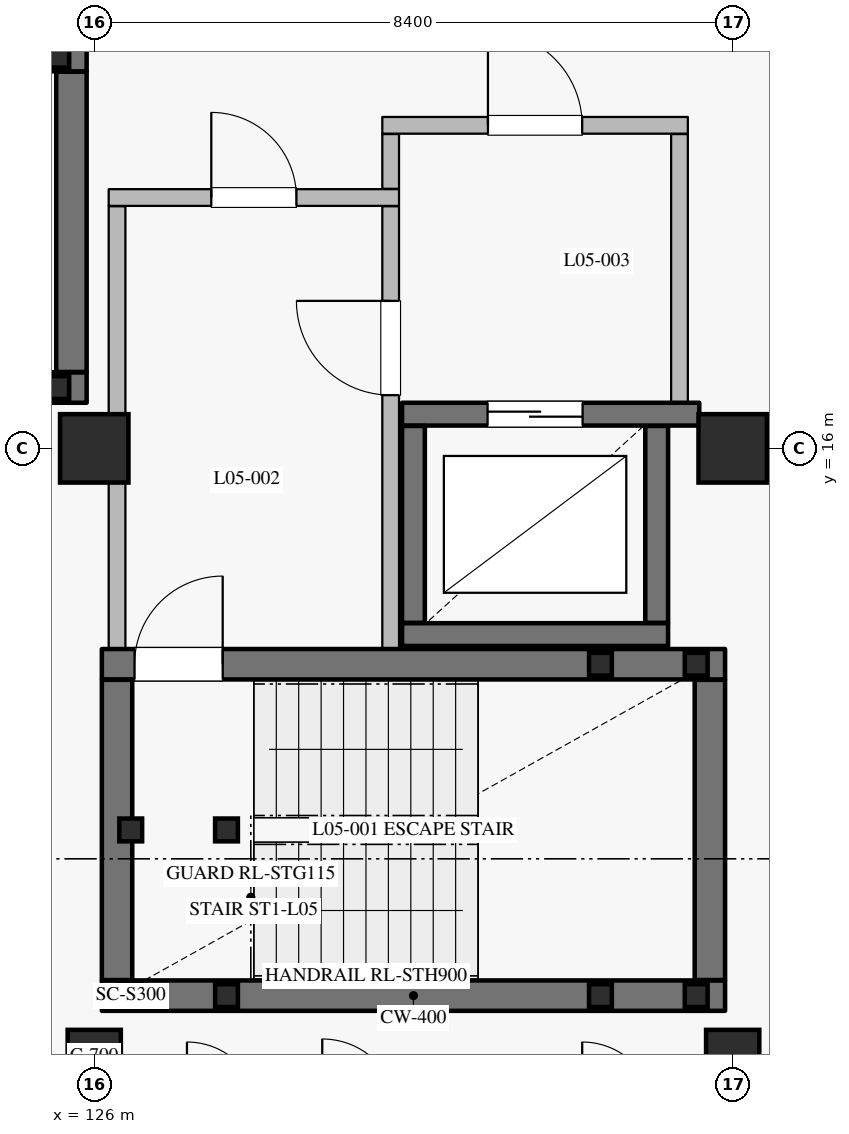
"""IFC4 building model, lengths in metres.
Left out: names, types, materials, properties, quantities, classifications, styles, units other than length and angle.
Written with IfcOpenShell. Run it as: python <this file> out.ifc"""

import sys

from ifc_helpers import new_model, si_unit, direction, frame, frame_2d, origin, origin_2d, place, context, subcontext, project, spatial, rectangle, hollow_rectangle, extrude, element, fill, save


model = new_model("IFC4")
c1 = context("Model", 3, precision=1e-05, world=origin(), true_north=direction((0.0, 1.0)))
c2 = subcontext(c1, "Body", "Model", "MODEL_VIEW")
j1 = project(units=[si_unit("LENGTHUNIT", "METRE"), si_unit("PLANEANGLEUNIT", "RADIAN")], contexts=[c1])
p1 = place(None, origin())
s1 = spatial("IfcSite", under=j1, at=p1, CompositionType="ELEMENT")
p2 = place(p1, origin())
s2 = spatial("IfcBuilding", under=s1, at=p2, CompositionType="ELEMENT")
p3 = place(p2, frame((0.0, 0.0, 25.2)))
s3 = spatial("IfcBuildingStorey", under=s2, at=p3, CompositionType="ELEMENT", Elevation=25.2)
for number, where, z_axis, x_axis in (
    (1, (126.0, 16.0, 0.0), (0.0, 0.0, 1.0), (1.0, 0.0, 0.0)),
    (2, (134.4, 16.0, 0.0), (0.0, 0.0, 1.0), (1.0, 0.0, 0.0)),
):
    element("IfcColumn", number, at=place(p3, frame(where, z_axis=z_axis, x_axis=x_axis)), inside=s3, PredefinedType="COLUMN", context=c2, shape_type="SweptSolid", body=[
        extrude(rectangle(XDim=0.9, YDim=0.9, at=origin_2d()), origin(), (0.0, 0.0, 1.0), 3.6),
    ])
for number, where, z_axis, x_axis in (
    (3, (126.0, 8.0, 0.0), (0.0, 0.0, 1.0), (1.0, 0.0, 0.0)),
    (4, (134.4, 8.0, 0.0), (0.0, 0.0, 1.0), (1.0, 0.0, 0.0)),
):
    element("IfcColumn", number, at=place(p3, frame(where, z_axis=z_axis, x_axis=x_axis)), inside=s3, PredefinedType="COLUMN", context=c2, shape_type="SweptSolid", body=[
        extrude(rectangle(XDim=0.7, YDim=0.7, at=origin_2d()), origin(), (0.0, 0.0, 1.0), 3.6),
    ])
p4 = place(p3, frame((130.05, 13.55, 0.0), z_axis=(0.0, 0.0, 1.0), x_axis=(1.0, 0.0, 0.0)))
e5 = element("IfcWall", 5, at=p4, inside=s3, PredefinedType="SHEAR", context=c2, shape_type="SweptSolid", body=[
    extrude(rectangle(XDim=3.5, YDim=0.3, at=frame_2d((1.75, 0.0))), origin(), (0.0, 0.0, 1.0), 3.335),
])
p5 = place(p3, frame((133.4, 13.705, 0.0), z_axis=(0.0, 0.0, 1.0), x_axis=(0.0, 1.0, 0.0)))
e6 = element("IfcWall", 6, at=p5, inside=s3, PredefinedType="SHEAR", context=c2, shape_type="SweptSolid", body=[
    extrude(rectangle(XDim=2.59, YDim=0.3, at=frame_2d((1.295, 0.0))), origin(), (0.0, 0.0, 1.0), 3.335),
])
p6 = place(p3, frame((133.96, 16.45, 0.0), z_axis=(0.0, 0.0, 1.0), x_axis=(-1.0, 0.0, 0.0)))
e7 = element("IfcWall", 7, at=p6, inside=s3, PredefinedType="SHEAR", context=c2, shape_type="SweptSolid", body=[
    extrude(rectangle(XDim=3.91, YDim=0.3, at=frame_2d((1.955, 0.0))), origin(), (0.0, 0.0, 1.0), 3.335),
])
p7 = place(p6, frame((1.535, 0.0, 0.0)))
e8 = element("IfcOpeningElement", 8, at=p7, cuts=e7, PredefinedType="OPENING", context=c2, shape_type="SweptSolid", body=[
    extrude(rectangle(XDim=1.25, YDim=2.25, at=frame_2d((0.625, 1.125))), frame((0.0, 0.16, 0.0), z_axis=(0.0, -1.0, 0.0), x_axis=(1.0, 0.0, 0.0)), (0.0, 0.0, 1.0), 0.32),
])
p8 = place(p3, frame((130.2, 16.295, 0.0), z_axis=(0.0, 0.0, 1.0), x_axis=(0.0, -1.0, 0.0)))
e9 = element("IfcWall", 9, at=p8, inside=s3, PredefinedType="SHEAR", context=c2, shape_type="SweptSolid", body=[
    extrude(rectangle(XDim=2.59, YDim=0.3, at=frame_2d((1.295, 0.0))), origin(), (0.0, 0.0, 1.0), 3.335),
])
p9 = place(p3, frame((126.1, 8.8, 0.0), z_axis=(0.0, 0.0, 1.0), x_axis=(1.0, 0.0, 0.0)))
e10 = element("IfcWall", 10, at=p9, inside=s3, PredefinedType="SHEAR", context=c2, shape_type="SweptSolid", body=[
    extrude(rectangle(XDim=8.2, YDim=0.4, at=frame_2d((4.1, 0.0))), origin(), (0.0, 0.0, 1.0), 3.335),
])
p10 = place(p3, frame((134.1, 9.005, 0.0), z_axis=(0.0, 0.0, 1.0), x_axis=(0.0, 1.0, 0.0)))
e11 = element("IfcWall", 11, at=p10, inside=s3, PredefinedType="SHEAR", context=c2, shape_type="SweptSolid", body=[
    extrude(rectangle(XDim=3.95, YDim=0.4, at=frame_2d((1.975, 0.0))), origin(), (0.0, 0.0, 1.0), 3.335),
])
p11 = place(p3, frame((126.1, 13.16, 0.0), z_axis=(0.0, 0.0, 1.0), x_axis=(1.0, 0.0, 0.0)))
e12 = element("IfcWall", 12, at=p11, inside=s3, PredefinedType="SHEAR", context=c2, shape_type="SweptSolid", body=[
    extrude(rectangle(XDim=8.2, YDim=0.4, at=frame_2d((4.1, 0.0))), origin(), (0.0, 0.0, 1.0), 3.335),
])
p12 = place(p11, frame((0.43, 0.0, 0.0)))
e13 = element("IfcOpeningElement", 13, at=p12, cuts=e12, PredefinedType="OPENING", context=c2, shape_type="SweptSolid", body=[
    extrude(rectangle(XDim=1.16, YDim=2.2, at=frame_2d((0.58, 1.1))), frame((0.0, 0.21, 0.0), z_axis=(0.0, -1.0, 0.0), x_axis=(1.0, 0.0, 0.0)), (0.0, 0.0, 1.0), 0.42),
])
p13 = place(p3, frame((126.3, 9.005, 0.0), z_axis=(0.0, 0.0, 1.0), x_axis=(0.0, 1.0, 0.0)))
e14 = element("IfcWall", 14, at=p13, inside=s3, PredefinedType="SHEAR", context=c2, shape_type="SweptSolid", body=[
    extrude(rectangle(XDim=3.95, YDim=0.4, at=frame_2d((1.975, 0.0))), origin(), (0.0, 0.0, 1.0), 3.335),
])
p14 = place(p3, frame((126.3, 13.365, 0.0), z_axis=(0.0, 0.0, 1.0), x_axis=(0.0, 1.0, 0.0)))
e15 = element("IfcWall", 15, at=p14, inside=s3, PredefinedType="PARTITIONING", context=c2, shape_type="SweptSolid", body=[
    extrude(rectangle(XDim=5.82, YDim=0.22, at=frame_2d((2.91, 0.0))), origin(), (0.0, 0.0, 1.0), 3.335),
])
p15 = place(p3, frame((126.19, 19.3, 0.0), z_axis=(0.0, 0.0, 1.0), x_axis=(1.0, 0.0, 0.0)))
e16 = element("IfcWall", 16, at=p15, inside=s3, PredefinedType="PARTITIONING", context=c2, shape_type="SweptSolid", body=[
    extrude(rectangle(XDim=3.82, YDim=0.22, at=frame_2d((1.91, 0.0))), origin(), (0.0, 0.0, 1.0), 3.335),
])
p16 = place(p15, frame((1.35, 0.0, 0.0)))
e17 = element("IfcOpeningElement", 17, at=p16, cuts=e16, PredefinedType="OPENING", context=c2, shape_type="SweptSolid", body=[
    extrude(rectangle(XDim=1.12, YDim=2.2, at=frame_2d((0.56, 1.1))), frame((0.0, 0.12, 0.0), z_axis=(0.0, -1.0, 0.0), x_axis=(1.0, 0.0, 0.0)), (0.0, 0.0, 1.0), 0.24),
])
p17 = place(p3, frame((129.9, 13.365, 0.0), z_axis=(0.0, 0.0, 1.0), x_axis=(0.0, 1.0, 0.0)))
e18 = element("IfcWall", 18, at=p17, inside=s3, PredefinedType="PARTITIONING", context=c2, shape_type="SweptSolid", body=[
    extrude(rectangle(XDim=5.82, YDim=0.22, at=frame_2d((2.91, 0.0))), origin(), (0.0, 0.0, 1.0), 3.335),
])
p18 = place(p17, frame((3.335, 0.0, 0.0)))
e19 = element("IfcOpeningElement", 19, at=p18, cuts=e18, PredefinedType="OPENING", context=c2, shape_type="SweptSolid", body=[
    extrude(rectangle(XDim=1.24, YDim=2.2, at=frame_2d((0.62, 1.1))), frame((0.0, 0.12, 0.0), z_axis=(0.0, -1.0, 0.0), x_axis=(1.0, 0.0, 0.0)), (0.0, 0.0, 1.0), 0.24),
])
p19 = place(p3, frame((129.9, 19.415, 0.0), z_axis=(0.0, 0.0, 1.0), x_axis=(0.0, 1.0, 0.0)))
e20 = element("IfcWall", 20, at=p19, inside=s3, PredefinedType="PARTITIONING", context=c2, shape_type="SweptSolid", body=[
    extrude(rectangle(XDim=0.72, YDim=0.22, at=frame_2d((0.36, 0.0))), origin(), (0.0, 0.0, 1.0), 3.335),
])
p20 = place(p3, frame((133.7, 16.605, 0.0), z_axis=(0.0, 0.0, 1.0), x_axis=(0.0, 1.0, 0.0)))
e21 = element("IfcWall", 21, at=p20, inside=s3, PredefinedType="PARTITIONING", context=c2, shape_type="SweptSolid", body=[
    extrude(rectangle(XDim=3.53, YDim=0.22, at=frame_2d((1.765, 0.0))), origin(), (0.0, 0.0, 1.0), 3.335),
])
p21 = place(p3, frame((129.79, 20.25, 0.0), z_axis=(0.0, 0.0, 1.0), x_axis=(1.0, 0.0, 0.0)))
e22 = element("IfcWall", 22, at=p21, inside=s3, PredefinedType="PARTITIONING", context=c2, shape_type="SweptSolid", body=[
    extrude(rectangle(XDim=4.02, YDim=0.22, at=frame_2d((2.01, 0.0))), origin(), (0.0, 0.0, 1.0), 3.335),
])
p22 = place(p21, frame((1.39, 0.0, 0.0)))
e23 = element("IfcOpeningElement", 23, at=p22, cuts=e22, PredefinedType="OPENING", context=c2, shape_type="SweptSolid", body=[
    extrude(rectangle(XDim=1.24, YDim=2.2, at=frame_2d((0.62, 1.1))), frame((0.0, 0.12, 0.0), z_axis=(0.0, -1.0, 0.0), x_axis=(1.0, 0.0, 0.0)), (0.0, 0.0, 1.0), 0.24),
])
for number, where, z_axis, x_axis in (
    (24, (126.48, 8.8, 0.0), (0.0, 0.0, 1.0), (1.0, 0.0, 0.0)),
    (25, (126.48, 10.98, 0.0), (0.0, 0.0, 1.0), (1.0, 0.0, 0.0)),
    (26, (127.74, 8.8, 0.0), (0.0, 0.0, 1.0), (1.0, 0.0, 0.0)),
    (27, (127.74, 10.98, 0.0), (0.0, 0.0, 1.0), (1.0, 0.0, 0.0)),
):
    element("IfcColumn", number, at=place(p3, frame(where, z_axis=z_axis, x_axis=x_axis)), inside=s3, PredefinedType="COLUMN", context=c2, shape_type="SweptSolid", body=[
        extrude(hollow_rectangle(XDim=0.3, YDim=0.3, WallThickness=0.012, at=origin_2d()), origin(), (0.0, 0.0, 1.0), 3.42),
    ])
for number, where, z_axis, x_axis in (
    (28, (132.66, 8.8, -2.1), (0.0, 0.0, 1.0), (1.0, 0.0, 0.0)),
    (29, (132.66, 13.16, -2.1), (0.0, 0.0, 1.0), (1.0, 0.0, 0.0)),
    (30, (133.92, 8.8, -2.1), (0.0, 0.0, 1.0), (1.0, 0.0, 0.0)),
    (31, (133.92, 13.16, -2.1), (0.0, 0.0, 1.0), (1.0, 0.0, 0.0)),
):
    element("IfcColumn", number, at=place(p3, frame(where, z_axis=z_axis, x_axis=x_axis)), inside=s3, PredefinedType="COLUMN", context=c2, shape_type="SweptSolid", body=[
        extrude(hollow_rectangle(XDim=0.3, YDim=0.3, WallThickness=0.012, at=origin_2d()), origin(), (0.0, 0.0, 1.0), 3.72),
    ])
p23 = place(p3, frame((117.75, 16.8, 0.0), z_axis=(0.0, 0.0, 1.0), x_axis=(1.0, 0.0, 0.0)))
e32 = element("IfcWall", 32, at=p23, inside=s3, PredefinedType="SHEAR", context=c2, shape_type="SweptSolid", body=[
    extrude(rectangle(XDim=8.15, YDim=0.4, at=frame_2d((4.075, 0.0))), origin(), (0.0, 0.0, 1.0), 3.335),
])
p24 = place(p3, frame((125.7, 17.005, 0.0), z_axis=(0.0, 0.0, 1.0), x_axis=(0.0, 1.0, 0.0)))
e33 = element("IfcWall", 33, at=p24, inside=s3, PredefinedType="SHEAR", context=c2, shape_type="SweptSolid", body=[
    extrude(rectangle(XDim=3.95, YDim=0.4, at=frame_2d((1.975, 0.0))), origin(), (0.0, 0.0, 1.0), 3.335),
])
p25 = place(p3, frame((117.75, 21.16, 0.0), z_axis=(0.0, 0.0, 1.0), x_axis=(1.0, 0.0, 0.0)))
e34 = element("IfcWall", 34, at=p25, inside=s3, PredefinedType="SHEAR", context=c2, shape_type="SweptSolid", body=[
    extrude(rectangle(XDim=8.15, YDim=0.4, at=frame_2d((4.075, 0.0))), origin(), (0.0, 0.0, 1.0), 3.335),
])
p26 = place(p25, frame((0.38, 0.0, 0.0)))
e35 = element("IfcOpeningElement", 35, at=p26, cuts=e34, PredefinedType="OPENING", context=c2, shape_type="SweptSolid", body=[
    extrude(rectangle(XDim=1.16, YDim=2.2, at=frame_2d((0.58, 1.1))), frame((0.0, 0.21, 0.0), z_axis=(0.0, -1.0, 0.0), x_axis=(1.0, 0.0, 0.0)), (0.0, 0.0, 1.0), 0.42),
])
for number, where, z_axis, x_axis in (
    (36, (125.52, 16.8, -2.1), (0.0, 0.0, 1.0), (1.0, 0.0, 0.0)),
    (37, (125.52, 21.16, -2.1), (0.0, 0.0, 1.0), (1.0, 0.0, 0.0)),
):
    element("IfcColumn", number, at=place(p3, frame(where, z_axis=z_axis, x_axis=x_axis)), inside=s3, PredefinedType="COLUMN", context=c2, shape_type="SweptSolid", body=[
        extrude(hollow_rectangle(XDim=0.3, YDim=0.3, WallThickness=0.012, at=origin_2d()), origin(), (0.0, 0.0, 1.0), 3.72),
    ])
p27 = place(p7, origin())
e38 = element("IfcDoor", 38, at=p27, inside=s3, OperationType="DOUBLE_DOOR_SLIDING", PredefinedType="DOOR", context=c2, shape_type="SweptSolid", body=[
    extrude(rectangle(XDim=1.25, YDim=2.25, at=frame_2d((0.625, 1.125))), frame((0.0, 0.025, 0.0), z_axis=(0.0, -1.0, 0.0), x_axis=(1.0, 0.0, 0.0)), (0.0, 0.0, 1.0), 0.05),
])
fill(e8, e38)
p28 = place(p12, origin())
e39 = element("IfcDoor", 39, at=p28, inside=s3, OperationType="SINGLE_SWING_RIGHT", PredefinedType="DOOR", context=c2, shape_type="SweptSolid", body=[
    extrude(rectangle(XDim=1.16, YDim=2.2, at=frame_2d((0.58, 1.1))), frame((0.0, 0.025, 0.0), z_axis=(0.0, -1.0, 0.0), x_axis=(1.0, 0.0, 0.0)), (0.0, 0.0, 1.0), 0.05),
])
fill(e13, e39)
p29 = place(p16, origin())
e40 = element("IfcDoor", 40, at=p29, inside=s3, OperationType="SINGLE_SWING_LEFT", PredefinedType="DOOR", context=c2, shape_type="SweptSolid", body=[
    extrude(rectangle(XDim=1.12, YDim=2.2, at=frame_2d((0.56, 1.1))), frame((0.0, 0.025, 0.0), z_axis=(0.0, -1.0, 0.0), x_axis=(1.0, 0.0, 0.0)), (0.0, 0.0, 1.0), 0.05),
])
fill(e17, e40)
p30 = place(p18, origin())
e41 = element("IfcDoor", 41, at=p30, inside=s3, OperationType="SINGLE_SWING_RIGHT", PredefinedType="DOOR", context=c2, shape_type="SweptSolid", body=[
    extrude(rectangle(XDim=1.24, YDim=2.2, at=frame_2d((0.62, 1.1))), frame((0.0, 0.025, 0.0), z_axis=(0.0, -1.0, 0.0), x_axis=(1.0, 0.0, 0.0)), (0.0, 0.0, 1.0), 0.05),
])
fill(e19, e41)
p31 = place(p22, origin())
e42 = element("IfcDoor", 42, at=p31, inside=s3, OperationType="SINGLE_SWING_LEFT", PredefinedType="DOOR", context=c2, shape_type="SweptSolid", body=[
    extrude(rectangle(XDim=1.24, YDim=2.2, at=frame_2d((0.62, 1.1))), frame((0.0, 0.025, 0.0), z_axis=(0.0, -1.0, 0.0), x_axis=(1.0, 0.0, 0.0)), (0.0, 0.0, 1.0), 0.05),
])
fill(e23, e42)
save(model, sys.argv[1])
